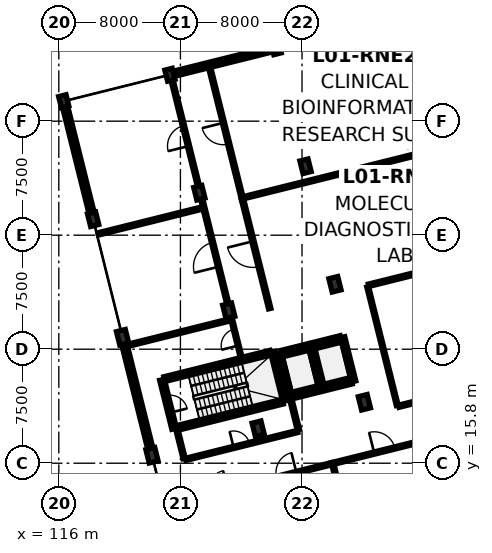
"""IFC4 building model, lengths in metres.
Left out: names, types, materials, properties, quantities, classifications, styles, units other than length and angle.
Written with IfcOpenShell. Run it as: python <this file> out.ifc"""

import sys

from ifc_helpers import new_model, si_unit, direction, frame, frame_2d, origin, origin_2d, place, context, subcontext, project, spatial, rectangle, extrude, element, fill, save


model = new_model("IFC4")
c1 = context("Model", 3, precision=1e-05, world=origin(), true_north=direction((0.0, 1.0)))
c2 = subcontext(c1, "Body", "Model", "MODEL_VIEW")
j1 = project(units=[si_unit("LENGTHUNIT", "METRE"), si_unit("PLANEANGLEUNIT", "RADIAN")], contexts=[c1])
p1 = place(None, origin())
s1 = spatial("IfcSite", under=j1, at=p1, CompositionType="ELEMENT")
p2 = place(p1, origin())
s2 = spatial("IfcBuilding", under=s1, at=p2, CompositionType="ELEMENT")
p3 = place(p2, frame((0.0, 0.0, 5.0)))
s3 = spatial("IfcBuildingStorey", under=s2, at=p3, CompositionType="ELEMENT", Elevation=5.0)
for number, where, z_axis, x_axis in (
    (1, (122.129, 16.325, 0.0), (0.0, 0.0, 1.0), (0.97, 0.242, 0.0)),
    (2, (120.194, 24.087, 0.0), (0.0, 0.0, 1.0), (0.97, 0.242, 0.0)),
):
    element("IfcColumn", number, at=place(p3, frame(where, z_axis=z_axis, x_axis=x_axis)), inside=s3, PredefinedType="COLUMN", context=c2, shape_type="SweptSolid", body=[
        extrude(rectangle(XDim=0.6, YDim=0.9, at=origin_2d()), origin(), (0.0, 0.0, 1.0), 4.2),
    ])
p4 = place(p3, frame((118.259, 31.849, 0.0), z_axis=(0.0, 0.0, 1.0), x_axis=(0.970295726276, 0.2419218956, 0.0)))
e3 = element("IfcColumn", 3, at=p4, inside=s3, PredefinedType="COLUMN", context=c2, shape_type="SweptSolid", body=[
    extrude(rectangle(XDim=0.55, YDim=0.85, at=origin_2d()), origin(), (0.0, 0.0, 1.0), 4.2),
])
p5 = place(p3, frame((116.323, 39.612, 0.0), z_axis=(0.0, 0.0, 1.0), x_axis=(0.970295726276, 0.2419218956, 0.0)))
e4 = element("IfcColumn", 4, at=p5, inside=s3, PredefinedType="COLUMN", context=c2, shape_type="SweptSolid", body=[
    extrude(rectangle(XDim=0.5, YDim=0.75, at=origin_2d()), origin(), (0.0, 0.0, 1.0), 4.2),
])
for number, where, z_axis, x_axis in (
    (5, (129.115, 18.067, 0.0), (0.0, 0.0, 1.0), (0.97, 0.242, 0.0)),
    (6, (127.18, 25.829, 0.0), (0.0, 0.0, 1.0), (0.97, 0.242, 0.0)),
):
    element("IfcColumn", number, at=place(p3, frame(where, z_axis=z_axis, x_axis=x_axis)), inside=s3, PredefinedType="COLUMN", context=c2, shape_type="SweptSolid", body=[
        extrude(rectangle(XDim=0.6, YDim=0.9, at=origin_2d()), origin(), (0.0, 0.0, 1.0), 4.2),
    ])
p6 = place(p3, frame((125.245, 33.591, 0.0), z_axis=(0.0, 0.0, 1.0), x_axis=(0.970295726276, 0.2419218956, 0.0)))
e7 = element("IfcColumn", 7, at=p6, inside=s3, PredefinedType="COLUMN", context=c2, shape_type="SweptSolid", body=[
    extrude(rectangle(XDim=0.55, YDim=0.85, at=origin_2d()), origin(), (0.0, 0.0, 1.0), 4.2),
])
p7 = place(p3, frame((123.309, 41.354, 0.0), z_axis=(0.0, 0.0, 1.0), x_axis=(0.970295726276, 0.2419218956, 0.0)))
e8 = element("IfcColumn", 8, at=p7, inside=s3, PredefinedType="COLUMN", context=c2, shape_type="SweptSolid", body=[
    extrude(rectangle(XDim=0.5, YDim=0.75, at=origin_2d()), origin(), (0.0, 0.0, 1.0), 4.2),
])
for number, where, z_axis, x_axis in (
    (9, (136.102, 19.808, 0.0), (0.0, 0.0, 1.0), (0.97, 0.242, 0.0)),
    (10, (134.166, 27.571, 0.0), (0.0, 0.0, 1.0), (0.97, 0.242, 0.0)),
):
    element("IfcColumn", number, at=place(p3, frame(where, z_axis=z_axis, x_axis=x_axis)), inside=s3, PredefinedType="COLUMN", context=c2, shape_type="SweptSolid", body=[
        extrude(rectangle(XDim=0.6, YDim=0.9, at=origin_2d()), origin(), (0.0, 0.0, 1.0), 4.2),
    ])
p8 = place(p3, frame((132.231, 35.333, 0.0), z_axis=(0.0, 0.0, 1.0), x_axis=(0.970295726276, 0.2419218956, 0.0)))
e11 = element("IfcColumn", 11, at=p8, inside=s3, PredefinedType="COLUMN", context=c2, shape_type="SweptSolid", body=[
    extrude(rectangle(XDim=0.55, YDim=0.85, at=origin_2d()), origin(), (0.0, 0.0, 1.0), 4.2),
])
for number, where, z_axis, x_axis in (
    (12, (130.295, 43.095, 0.0), (0.0, 0.0, 1.0), (0.97, 0.242, 0.0)),
    (13, (139.217, 37.075, 0.0), (0.0, 0.0, 1.0), (0.97, 0.242, 0.0)),
):
    element("IfcColumn", number, at=place(p3, frame(where, z_axis=z_axis, x_axis=x_axis)), inside=s3, PredefinedType="COLUMN", context=c2, shape_type="SweptSolid", body=[
        extrude(rectangle(XDim=0.5, YDim=0.75, at=origin_2d()), origin(), (0.0, 0.0, 1.0), 4.2),
    ])
p9 = place(p3, frame((122.02, 16.761, 0.0), z_axis=(0.0, 0.0, 1.0), x_axis=(-0.241912563448, 0.970298052995, 0.0)))
e14 = element("IfcWall", 14, at=p9, inside=s3, PredefinedType="SOLIDWALL", context=c2, shape_type="SweptSolid", body=[
    extrude(rectangle(XDim=7.1, YDim=0.35, at=frame_2d((3.55, 0.0))), origin(), (0.0, 0.0, 1.0), 3.485),
])
p10 = place(p3, frame((118.156, 32.262, 0.0), z_axis=(0.0, 0.0, 1.0), x_axis=(-0.241929233735, 0.970293896644, 0.0)))
e15 = element("IfcWall", 15, at=p10, inside=s3, PredefinedType="SOLIDWALL", context=c2, shape_type="SweptSolid", body=[
    extrude(rectangle(XDim=7.2, YDim=0.35, at=frame_2d((3.6, 0.0))), origin(), (0.0, 0.0, 1.0), 3.485),
])
p11 = place(p10, frame((2.8, 0.0, 0.9)))
e16 = element("IfcOpeningElement", 16, at=p11, cuts=e15, PredefinedType="OPENING", context=c2, shape_type="SweptSolid", body=[
    extrude(rectangle(XDim=1.6, YDim=1.3, at=frame_2d((0.8, 0.65))), frame((0.0, 0.187, 0.0), z_axis=(0.0, -1.0, 0.0), x_axis=(1.0, 0.0, 0.0)), (0.0, 0.0, 1.0), 0.374),
])
p12 = place(p3, frame((123.552, 41.414, 0.0), z_axis=(0.0, 0.0, 1.0), x_axis=(0.970296633454, 0.241918257079, 0.0)))
e17 = element("IfcWall", 17, at=p12, inside=s3, PredefinedType="SOLIDWALL", context=c2, shape_type="SweptSolid", body=[
    extrude(rectangle(XDim=6.7, YDim=0.35, at=frame_2d((3.35, 0.0))), origin(), (0.0, 0.0, 1.0), 3.385),
])
p13 = place(p3, frame((123.75, 18.11, 0.0), z_axis=(0.0, 0.0, 1.0), x_axis=(0.970294108333, 0.241928384724, 0.0)))
e18 = element("IfcWall", 18, at=p13, inside=s3, PredefinedType="SHEAR", context=c2, shape_type="SweptSolid", body=[
    extrude(rectangle(XDim=7.19, YDim=0.32, at=frame_2d((3.595, 0.0))), origin(), (0.0, 0.0, 1.0), 4.2),
])
p14 = place(p3, frame((130.887, 19.889, 0.0), z_axis=(0.0, 0.0, 1.0), x_axis=(-0.241947258837, 0.970289402158, 0.0)))
e19 = element("IfcWall", 19, at=p14, inside=s3, PredefinedType="SHEAR", context=c2, shape_type="SweptSolid", body=[
    extrude(rectangle(XDim=3.32, YDim=0.32, at=frame_2d((1.66, 0.0))), origin(), (0.0, 0.0, 1.0), 4.2),
])
p15 = place(p3, frame((129.924, 23.071, 0.0), z_axis=(0.0, 0.0, 1.0), x_axis=(-0.970294108333, -0.241928384724, 0.0)))
e20 = element("IfcWall", 20, at=p15, inside=s3, PredefinedType="SHEAR", context=c2, shape_type="SweptSolid", body=[
    extrude(rectangle(XDim=7.19, YDim=0.32, at=frame_2d((3.595, 0.0))), origin(), (0.0, 0.0, 1.0), 4.2),
])
p16 = place(p3, frame((122.787, 21.292, 0.0), z_axis=(0.0, 0.0, 1.0), x_axis=(0.241860763027, -0.970310966293, 0.0)))
e21 = element("IfcWall", 21, at=p16, inside=s3, PredefinedType="SHEAR", context=c2, shape_type="SweptSolid", body=[
    extrude(rectangle(XDim=3.32, YDim=0.32, at=frame_2d((1.66, 0.0))), origin(), (0.0, 0.0, 1.0), 4.2),
])
p17 = place(p16, frame((1.085, 0.0, 0.0)))
e22 = element("IfcOpeningElement", 22, at=p17, cuts=e21, PredefinedType="OPENING", context=c2, shape_type="SweptSolid", body=[
    extrude(rectangle(XDim=1.15, YDim=2.15, at=frame_2d((0.575, 1.075))), frame((0.0, 0.172, 0.0), z_axis=(0.0, -1.0, 0.0), x_axis=(1.0, 0.0, 0.0)), (0.0, 0.0, 1.0), 0.344),
])
p18 = place(p3, frame((131.363, 20.176, 0.0), z_axis=(0.0, 0.0, 1.0), x_axis=(0.970284587517, 0.241966566341, 0.0)))
e23 = element("IfcWall", 23, at=p18, inside=s3, PredefinedType="SHEAR", context=c2, shape_type="SweptSolid", body=[
    extrude(rectangle(XDim=1.817, YDim=0.28, at=frame_2d((0.909, 0.0))), origin(), (0.0, 0.0, 1.0), 4.2),
])
p19 = place(p3, frame((133.267, 20.651, 0.0), z_axis=(0.0, 0.0, 1.0), x_axis=(-0.241921647353, 0.970295788171, 0.0)))
e24 = element("IfcWall", 24, at=p19, inside=s3, PredefinedType="SHEAR", context=c2, shape_type="SweptSolid", body=[
    extrude(rectangle(XDim=2.994, YDim=0.28, at=frame_2d((1.497, 0.0))), origin(), (0.0, 0.0, 1.0), 4.2),
])
p20 = place(p3, frame((132.402, 23.521, 0.0), z_axis=(0.0, 0.0, 1.0), x_axis=(-0.970284587517, -0.241966566341, 0.0)))
e25 = element("IfcWall", 25, at=p20, inside=s3, PredefinedType="SHEAR", context=c2, shape_type="SweptSolid", body=[
    extrude(rectangle(XDim=1.817, YDim=0.28, at=frame_2d((0.909, 0.0))), origin(), (0.0, 0.0, 1.0), 4.2),
])
p21 = place(p20, frame((0.259, 0.0, 0.0)))
e26 = element("IfcOpeningElement", 26, at=p21, cuts=e25, PredefinedType="OPENING", context=c2, shape_type="SweptSolid", body=[
    extrude(rectangle(XDim=1.3, YDim=2.2, at=frame_2d((0.65, 1.1))), frame((0.0, 0.152, 0.0), z_axis=(0.0, -1.0, 0.0), x_axis=(1.0, 0.0, 0.0)), (0.0, 0.0, 1.0), 0.304),
])
p22 = place(p3, frame((130.498, 23.046, 0.0), z_axis=(0.0, 0.0, 1.0), x_axis=(0.241921647353, -0.970295788171, 0.0)))
e27 = element("IfcWall", 27, at=p22, inside=s3, PredefinedType="SHEAR", context=c2, shape_type="SweptSolid", body=[
    extrude(rectangle(XDim=2.994, YDim=0.28, at=frame_2d((1.497, 0.0))), origin(), (0.0, 0.0, 1.0), 4.2),
])
p23 = place(p3, frame((133.408, 20.686, 0.0), z_axis=(0.0, 0.0, 1.0), x_axis=(0.970285190026, 0.241964150272, 0.0)))
e28 = element("IfcWall", 28, at=p23, inside=s3, PredefinedType="SHEAR", context=c2, shape_type="SweptSolid", body=[
    extrude(rectangle(XDim=1.91, YDim=0.28, at=frame_2d((0.955, 0.0))), origin(), (0.0, 0.0, 1.0), 4.2),
])
p24 = place(p3, frame((135.402, 21.183, 0.0), z_axis=(0.0, 0.0, 1.0), x_axis=(-0.241921647353, 0.970295788171, 0.0)))
e29 = element("IfcWall", 29, at=p24, inside=s3, PredefinedType="SHEAR", context=c2, shape_type="SweptSolid", body=[
    extrude(rectangle(XDim=2.994, YDim=0.28, at=frame_2d((1.497, 0.0))), origin(), (0.0, 0.0, 1.0), 4.2),
])
p25 = place(p3, frame((134.537, 24.053, 0.0), z_axis=(0.0, 0.0, 1.0), x_axis=(-0.970285190026, -0.241964150272, 0.0)))
e30 = element("IfcWall", 30, at=p25, inside=s3, PredefinedType="SHEAR", context=c2, shape_type="SweptSolid", body=[
    extrude(rectangle(XDim=1.91, YDim=0.28, at=frame_2d((0.955, 0.0))), origin(), (0.0, 0.0, 1.0), 4.2),
])
p26 = place(p25, frame((0.305, 0.0, 0.0)))
e31 = element("IfcOpeningElement", 31, at=p26, cuts=e30, PredefinedType="OPENING", context=c2, shape_type="SweptSolid", body=[
    extrude(rectangle(XDim=1.3, YDim=2.2, at=frame_2d((0.65, 1.1))), frame((0.0, 0.152, 0.0), z_axis=(0.0, -1.0, 0.0), x_axis=(1.0, 0.0, 0.0)), (0.0, 0.0, 1.0), 0.304),
])
p27 = place(p3, frame((124.346, 16.053, 0.0), z_axis=(0.0, 0.0, 1.0), x_axis=(0.970295772287, 0.241921711059, 0.0)))
e32 = element("IfcWall", 32, at=p27, inside=s3, PredefinedType="PARTITIONING", context=c2, shape_type="SweptSolid", body=[
    extrude(rectangle(XDim=7.58, YDim=0.15, at=frame_2d((3.79, 0.0))), origin(), (0.0, 0.0, 1.0), 3.385),
])
p28 = place(p27, frame((3.25, 0.0, 0.0)))
e33 = element("IfcOpeningElement", 33, at=p28, cuts=e32, PredefinedType="OPENING", context=c2, shape_type="SweptSolid", body=[
    extrude(rectangle(XDim=1.08, YDim=2.18, at=frame_2d((0.54, 1.09))), frame((0.0, 0.087, 0.0), z_axis=(0.0, -1.0, 0.0), x_axis=(1.0, 0.0, 0.0)), (0.0, 0.0, 1.0), 0.174),
])
p29 = place(p3, frame((127.995, 22.767, 0.0), z_axis=(0.0, 0.0, 1.0), x_axis=(-0.241877500256, 0.9703067942, 0.0)))
e34 = element("IfcWall", 34, at=p29, inside=s3, PredefinedType="PARTITIONING", context=c2, shape_type="SweptSolid", body=[
    extrude(rectangle(XDim=2.706, YDim=0.125, at=frame_2d((1.353, 0.0))), origin(), (0.0, 0.0, 1.0), 4.2),
])
p30 = place(p29, frame((0.793, 0.0, 0.0)))
e35 = element("IfcOpeningElement", 35, at=p30, cuts=e34, PredefinedType="OPENING", context=c2, shape_type="SweptSolid", body=[
    extrude(rectangle(XDim=1.12, YDim=2.2, at=frame_2d((0.56, 1.1))), frame((0.0, 0.074, 0.0), z_axis=(0.0, -1.0, 0.0), x_axis=(1.0, 0.0, 0.0)), (0.0, 0.0, 1.0), 0.149),
])
p31 = place(p3, frame((128.023, 14.29, 0.0), z_axis=(0.0, 0.0, 1.0), x_axis=(0.970293282145, 0.241931698263, 0.0)))
e36 = element("IfcWall", 36, at=p31, inside=s3, PredefinedType="PARTITIONING", context=c2, shape_type="SweptSolid", body=[
    extrude(rectangle(XDim=6.088, YDim=0.15, at=frame_2d((3.044, 0.0))), origin(), (0.0, 0.0, 1.0), 3.385),
])
p32 = place(p31, frame((2.374, 0.0, 0.0)))
e37 = element("IfcOpeningElement", 37, at=p32, cuts=e36, PredefinedType="OPENING", context=c2, shape_type="SweptSolid", body=[
    extrude(rectangle(XDim=1.34, YDim=2.24, at=frame_2d((0.67, 1.12))), frame((0.0, 0.087, 0.0), z_axis=(0.0, -1.0, 0.0), x_axis=(1.0, 0.0, 0.0)), (0.0, 0.0, 1.0), 0.174),
])
p33 = place(p3, frame((133.942, 15.766, 0.0), z_axis=(0.0, 0.0, 1.0), x_axis=(0.970292162734, 0.241936187739, 0.0)))
e38 = element("IfcWall", 38, at=p33, inside=s3, PredefinedType="PARTITIONING", context=c2, shape_type="SweptSolid", body=[
    extrude(rectangle(XDim=7.188, YDim=0.15, at=frame_2d((3.594, 0.0))), origin(), (0.0, 0.0, 1.0), 3.385),
])
p34 = place(p33, frame((2.894, 0.0, 0.0)))
e39 = element("IfcOpeningElement", 39, at=p34, cuts=e38, PredefinedType="OPENING", context=c2, shape_type="SweptSolid", body=[
    extrude(rectangle(XDim=1.4, YDim=2.25, at=frame_2d((0.7, 1.125))), frame((0.0, 0.087, 0.0), z_axis=(0.0, -1.0, 0.0), x_axis=(1.0, 0.0, 0.0)), (0.0, 0.0, 1.0), 0.174),
])
p35 = place(p3, frame((138.367, 19.549, 0.0), z_axis=(0.0, 0.0, 1.0), x_axis=(0.970292357867, 0.241935405151, 0.0)))
e40 = element("IfcWall", 40, at=p35, inside=s3, PredefinedType="PARTITIONING", context=c2, shape_type="SweptSolid", body=[
    extrude(rectangle(XDim=12.06, YDim=0.15, at=frame_2d((6.03, 0.0))), origin(), (0.0, 0.0, 1.0), 3.385),
])
p36 = place(p35, frame((5.88, 0.0, 0.0)))
e41 = element("IfcOpeningElement", 41, at=p36, cuts=e40, PredefinedType="OPENING", context=c2, shape_type="SweptSolid", body=[
    extrude(rectangle(XDim=1.56, YDim=2.3, at=frame_2d((0.78, 1.15))), frame((0.0, 0.087, 0.0), z_axis=(0.0, -1.0, 0.0), x_axis=(1.0, 0.0, 0.0)), (0.0, 0.0, 1.0), 0.174),
])
p37 = place(p3, frame((127.221, 25.87, 0.0), z_axis=(0.0, 0.0, 1.0), x_axis=(-0.241902639837, 0.970300527074, 0.0)))
e42 = element("IfcWall", 42, at=p37, inside=s3, PredefinedType="PARTITIONING", context=c2, shape_type="SweptSolid", body=[
    extrude(rectangle(XDim=7.533, YDim=0.15, at=frame_2d((3.767, 0.0))), origin(), (0.0, 0.0, 1.0), 3.385),
])
p38 = place(p37, frame((2.941, 0.0, 0.0)))
e43 = element("IfcOpeningElement", 43, at=p38, cuts=e42, PredefinedType="OPENING", context=c2, shape_type="SweptSolid", body=[
    extrude(rectangle(XDim=1.65, YDim=2.32, at=frame_2d((0.825, 1.16))), frame((0.0, 0.087, 0.0), z_axis=(0.0, -1.0, 0.0), x_axis=(1.0, 0.0, 0.0)), (0.0, 0.0, 1.0), 0.174),
])
p39 = place(p3, frame((129.876, 25.97, 0.0), z_axis=(0.0, 0.0, 1.0), x_axis=(-0.241938716353, 0.970291532236, 0.0)))
e44 = element("IfcWall", 44, at=p39, inside=s3, PredefinedType="PARTITIONING", context=c2, shape_type="SweptSolid", body=[
    extrude(rectangle(XDim=7.411, YDim=0.16, at=frame_2d((3.706, 0.0))), origin(), (0.0, 0.0, 1.0), 3.485),
])
p40 = place(p39, frame((2.845, 0.0, 0.0)))
e45 = element("IfcOpeningElement", 45, at=p40, cuts=e44, PredefinedType="OPENING", context=c2, shape_type="SweptSolid", body=[
    extrude(rectangle(XDim=1.72, YDim=2.34, at=frame_2d((0.86, 1.17))), frame((0.0, 0.092, 0.0), z_axis=(0.0, -1.0, 0.0), x_axis=(1.0, 0.0, 0.0)), (0.0, 0.0, 1.0), 0.184),
])
p41 = place(p3, frame((125.28, 33.657, 0.0), z_axis=(0.0, 0.0, 1.0), x_axis=(-0.241913572398, 0.970297801445, 0.0)))
e46 = element("IfcWall", 46, at=p41, inside=s3, PredefinedType="PARTITIONING", context=c2, shape_type="SweptSolid", body=[
    extrude(rectangle(XDim=7.573, YDim=0.15, at=frame_2d((3.787, 0.0))), origin(), (0.0, 0.0, 1.0), 3.385),
])
p42 = place(p41, frame((3.096, 0.0, 0.0)))
e47 = element("IfcOpeningElement", 47, at=p42, cuts=e46, PredefinedType="OPENING", context=c2, shape_type="SweptSolid", body=[
    extrude(rectangle(XDim=1.38, YDim=2.3, at=frame_2d((0.69, 1.15))), frame((0.0, 0.087, 0.0), z_axis=(0.0, -1.0, 0.0), x_axis=(1.0, 0.0, 0.0)), (0.0, 0.0, 1.0), 0.174),
])
p43 = place(p3, frame((128.08, 33.173, 0.0), z_axis=(0.0, 0.0, 1.0), x_axis=(-0.241916302916, 0.970297120672, 0.0)))
e48 = element("IfcWall", 48, at=p43, inside=s3, PredefinedType="PARTITIONING", context=c2, shape_type="SweptSolid", body=[
    extrude(rectangle(XDim=8.905, YDim=0.15, at=frame_2d((4.453, 0.0))), origin(), (0.0, 0.0, 1.0), 3.485),
])
p44 = place(p43, frame((3.733, 0.0, 0.0)))
e49 = element("IfcOpeningElement", 49, at=p44, cuts=e48, PredefinedType="OPENING", context=c2, shape_type="SweptSolid", body=[
    extrude(rectangle(XDim=1.44, YDim=2.32, at=frame_2d((0.72, 1.16))), frame((0.0, 0.087, 0.0), z_axis=(0.0, -1.0, 0.0), x_axis=(1.0, 0.0, 0.0)), (0.0, 0.0, 1.0), 0.174),
])
p45 = place(p3, frame((124.243, 16.115, 0.0), z_axis=(0.0, 0.0, 1.0), x_axis=(-0.24202255973, 0.970270622343, 0.0)))
e50 = element("IfcWall", 50, at=p45, inside=s3, PredefinedType="PARTITIONING", context=c2, shape_type="SweptSolid", body=[
    extrude(rectangle(XDim=1.792, YDim=0.15, at=frame_2d((0.896, 0.0))), origin(), (0.0, 0.0, 1.0), 3.485),
])
p46 = place(p3, frame((131.763, 17.99, 0.0), z_axis=(0.0, 0.0, 1.0), x_axis=(-0.241962612769, 0.970285573438, 0.0)))
e51 = element("IfcWall", 51, at=p46, inside=s3, PredefinedType="PARTITIONING", context=c2, shape_type="SweptSolid", body=[
    extrude(rectangle(XDim=2.206, YDim=0.16, at=frame_2d((1.103, 0.0))), origin(), (0.0, 0.0, 1.0), 3.485),
])
p47 = place(p3, frame((120.521, 23.55, 0.0), z_axis=(0.0, 0.0, 1.0), x_axis=(0.970294380964, 0.241927291286, 0.0)))
e52 = element("IfcWall", 52, at=p47, inside=s3, PredefinedType="PARTITIONING", context=c2, shape_type="SweptSolid", body=[
    extrude(rectangle(XDim=6.988, YDim=0.15, at=frame_2d((3.494, 0.0))), origin(), (0.0, 0.0, 1.0), 3.485),
])
p48 = place(p3, frame((135.733, 8.887, 0.0), z_axis=(0.0, 0.0, 1.0), x_axis=(-0.241913757308, 0.970297755344, 0.0)))
e53 = element("IfcWall", 53, at=p48, inside=s3, PredefinedType="PARTITIONING", context=c2, shape_type="SweptSolid", body=[
    extrude(rectangle(XDim=7.021, YDim=0.15, at=frame_2d((3.51, 0.0))), origin(), (0.0, 0.0, 1.0), 3.485),
])
p49 = place(p3, frame((136.383, 27.505, 0.0), z_axis=(0.0, 0.0, 1.0), x_axis=(0.970298155851, 0.241912150896, 0.0)))
e54 = element("IfcWall", 54, at=p49, inside=s3, PredefinedType="PARTITIONING", context=c2, shape_type="SweptSolid", body=[
    extrude(rectangle(XDim=12.163, YDim=0.16, at=frame_2d((6.082, 0.0))), origin(), (0.0, 0.0, 1.0), 3.385),
])
p50 = place(p3, frame((138.264, 19.611, 0.0), z_axis=(0.0, 0.0, 1.0), x_axis=(-0.241920353256, 0.970296110824, 0.0)))
e55 = element("IfcWall", 55, at=p50, inside=s3, PredefinedType="PARTITIONING", context=c2, shape_type="SweptSolid", body=[
    extrude(rectangle(XDim=8.03, YDim=0.125, at=frame_2d((4.015, 0.0))), origin(), (0.0, 0.0, 1.0), 3.485),
])
p51 = place(p3, frame((118.604, 30.885, 0.0), z_axis=(0.0, 0.0, 1.0), x_axis=(0.970294847648, 0.241925419556, 0.0)))
e56 = element("IfcWall", 56, at=p51, inside=s3, PredefinedType="PARTITIONING", context=c2, shape_type="SweptSolid", body=[
    extrude(rectangle(XDim=7.061, YDim=0.16, at=frame_2d((3.531, 0.0))), origin(), (0.0, 0.0, 1.0), 3.385),
])
p52 = place(p3, frame((128.147, 33.264, 0.0), z_axis=(0.0, 0.0, 1.0), x_axis=(0.970293031027, 0.241932705395, 0.0)))
e57 = element("IfcWall", 57, at=p52, inside=s3, PredefinedType="PARTITIONING", context=c2, shape_type="SweptSolid", body=[
    extrude(rectangle(XDim=18.676, YDim=0.15, at=frame_2d((9.338, 0.0))), origin(), (0.0, 0.0, 1.0), 3.385),
])
p53 = place(p11, origin())
e58 = element("IfcWindow", 58, at=p53, inside=s3, PartitioningType="DOUBLE_PANEL_VERTICAL", PredefinedType="WINDOW", context=c2, shape_type="SweptSolid", body=[
    extrude(rectangle(XDim=1.6, YDim=1.3, at=frame_2d((0.8, 0.65))), frame((0.0, 0.03, 0.0), z_axis=(0.0, -1.0, 0.0), x_axis=(1.0, 0.0, 0.0)), (0.0, 0.0, 1.0), 0.06),
])
fill(e16, e58)
p54 = place(p17, origin())
e59 = element("IfcDoor", 59, at=p54, inside=s3, OperationType="SINGLE_SWING_RIGHT", PredefinedType="DOOR", context=c2, shape_type="SweptSolid", body=[
    extrude(rectangle(XDim=1.15, YDim=2.15, at=frame_2d((0.575, 1.075))), frame((0.0, 0.025, 0.0), z_axis=(0.0, -1.0, 0.0), x_axis=(1.0, 0.0, 0.0)), (0.0, 0.0, 1.0), 0.05),
])
fill(e22, e59)
p55 = place(p21, origin())
e60 = element("IfcDoor", 60, at=p55, inside=s3, OperationType="SLIDING_TO_LEFT", PredefinedType="DOOR", context=c2, shape_type="SweptSolid", body=[
    extrude(rectangle(XDim=1.3, YDim=2.2, at=frame_2d((0.65, 1.1))), frame((0.0, 0.025, 0.0), z_axis=(0.0, -1.0, 0.0), x_axis=(1.0, 0.0, 0.0)), (0.0, 0.0, 1.0), 0.05),
])
fill(e26, e60)
p56 = place(p26, origin())
e61 = element("IfcDoor", 61, at=p56, inside=s3, OperationType="SLIDING_TO_RIGHT", PredefinedType="DOOR", context=c2, shape_type="SweptSolid", body=[
    extrude(rectangle(XDim=1.3, YDim=2.2, at=frame_2d((0.65, 1.1))), frame((0.0, 0.025, 0.0), z_axis=(0.0, -1.0, 0.0), x_axis=(1.0, 0.0, 0.0)), (0.0, 0.0, 1.0), 0.05),
])
fill(e31, e61)
p57 = place(p28, origin())
e62 = element("IfcDoor", 62, at=p57, inside=s3, OperationType="SINGLE_SWING_LEFT", PredefinedType="DOOR", context=c2, shape_type="SweptSolid", body=[
    extrude(rectangle(XDim=1.08, YDim=2.18, at=frame_2d((0.54, 1.09))), frame((0.0, 0.025, 0.0), z_axis=(0.0, -1.0, 0.0), x_axis=(1.0, 0.0, 0.0)), (0.0, 0.0, 1.0), 0.05),
])
fill(e33, e62)
p58 = place(p30, origin())
e63 = element("IfcDoor", 63, at=p58, inside=s3, OperationType="SINGLE_SWING_LEFT", PredefinedType="DOOR", context=c2, shape_type="SweptSolid", body=[
    extrude(rectangle(XDim=1.12, YDim=2.2, at=frame_2d((0.56, 1.1))), frame((0.0, 0.025, 0.0), z_axis=(0.0, -1.0, 0.0), x_axis=(1.0, 0.0, 0.0)), (0.0, 0.0, 1.0), 0.05),
])
fill(e35, e63)
p59 = place(p32, origin())
e64 = element("IfcDoor", 64, at=p59, inside=s3, OperationType="SINGLE_SWING_RIGHT", PredefinedType="DOOR", context=c2, shape_type="SweptSolid", body=[
    extrude(rectangle(XDim=1.34, YDim=2.24, at=frame_2d((0.67, 1.12))), frame((0.0, 0.025, 0.0), z_axis=(0.0, -1.0, 0.0), x_axis=(1.0, 0.0, 0.0)), (0.0, 0.0, 1.0), 0.05),
])
fill(e37, e64)
p60 = place(p34, origin())
e65 = element("IfcDoor", 65, at=p60, inside=s3, OperationType="SINGLE_SWING_LEFT", PredefinedType="DOOR", context=c2, shape_type="SweptSolid", body=[
    extrude(rectangle(XDim=1.4, YDim=2.25, at=frame_2d((0.7, 1.125))), frame((0.0, 0.025, 0.0), z_axis=(0.0, -1.0, 0.0), x_axis=(1.0, 0.0, 0.0)), (0.0, 0.0, 1.0), 0.05),
])
fill(e39, e65)
p61 = place(p38, origin())
e66 = element("IfcDoor", 66, at=p61, inside=s3, OperationType="SINGLE_SWING_LEFT", PredefinedType="DOOR", context=c2, shape_type="SweptSolid", body=[
    extrude(rectangle(XDim=1.65, YDim=2.32, at=frame_2d((0.825, 1.16))), frame((0.0, 0.025, 0.0), z_axis=(0.0, -1.0, 0.0), x_axis=(1.0, 0.0, 0.0)), (0.0, 0.0, 1.0), 0.05),
])
fill(e43, e66)
p62 = place(p40, origin())
e67 = element("IfcDoor", 67, at=p62, inside=s3, OperationType="SINGLE_SWING_RIGHT", PredefinedType="DOOR", context=c2, shape_type="SweptSolid", body=[
    extrude(rectangle(XDim=1.72, YDim=2.34, at=frame_2d((0.86, 1.17))), frame((0.0, 0.025, 0.0), z_axis=(0.0, -1.0, 0.0), x_axis=(1.0, 0.0, 0.0)), (0.0, 0.0, 1.0), 0.05),
])
fill(e45, e67)
p63 = place(p42, origin())
e68 = element("IfcDoor", 68, at=p63, inside=s3, OperationType="SINGLE_SWING_LEFT", PredefinedType="DOOR", context=c2, shape_type="SweptSolid", body=[
    extrude(rectangle(XDim=1.38, YDim=2.3, at=frame_2d((0.69, 1.15))), frame((0.0, 0.025, 0.0), z_axis=(0.0, -1.0, 0.0), x_axis=(1.0, 0.0, 0.0)), (0.0, 0.0, 1.0), 0.05),
])
fill(e47, e68)
p64 = place(p44, origin())
e69 = element("IfcDoor", 69, at=p64, inside=s3, OperationType="SINGLE_SWING_RIGHT", PredefinedType="DOOR", context=c2, shape_type="SweptSolid", body=[
    extrude(rectangle(XDim=1.44, YDim=2.32, at=frame_2d((0.72, 1.16))), frame((0.0, 0.025, 0.0), z_axis=(0.0, -1.0, 0.0), x_axis=(1.0, 0.0, 0.0)), (0.0, 0.0, 1.0), 0.05),
])
fill(e49, e69)
save(model, sys.argv[1])
